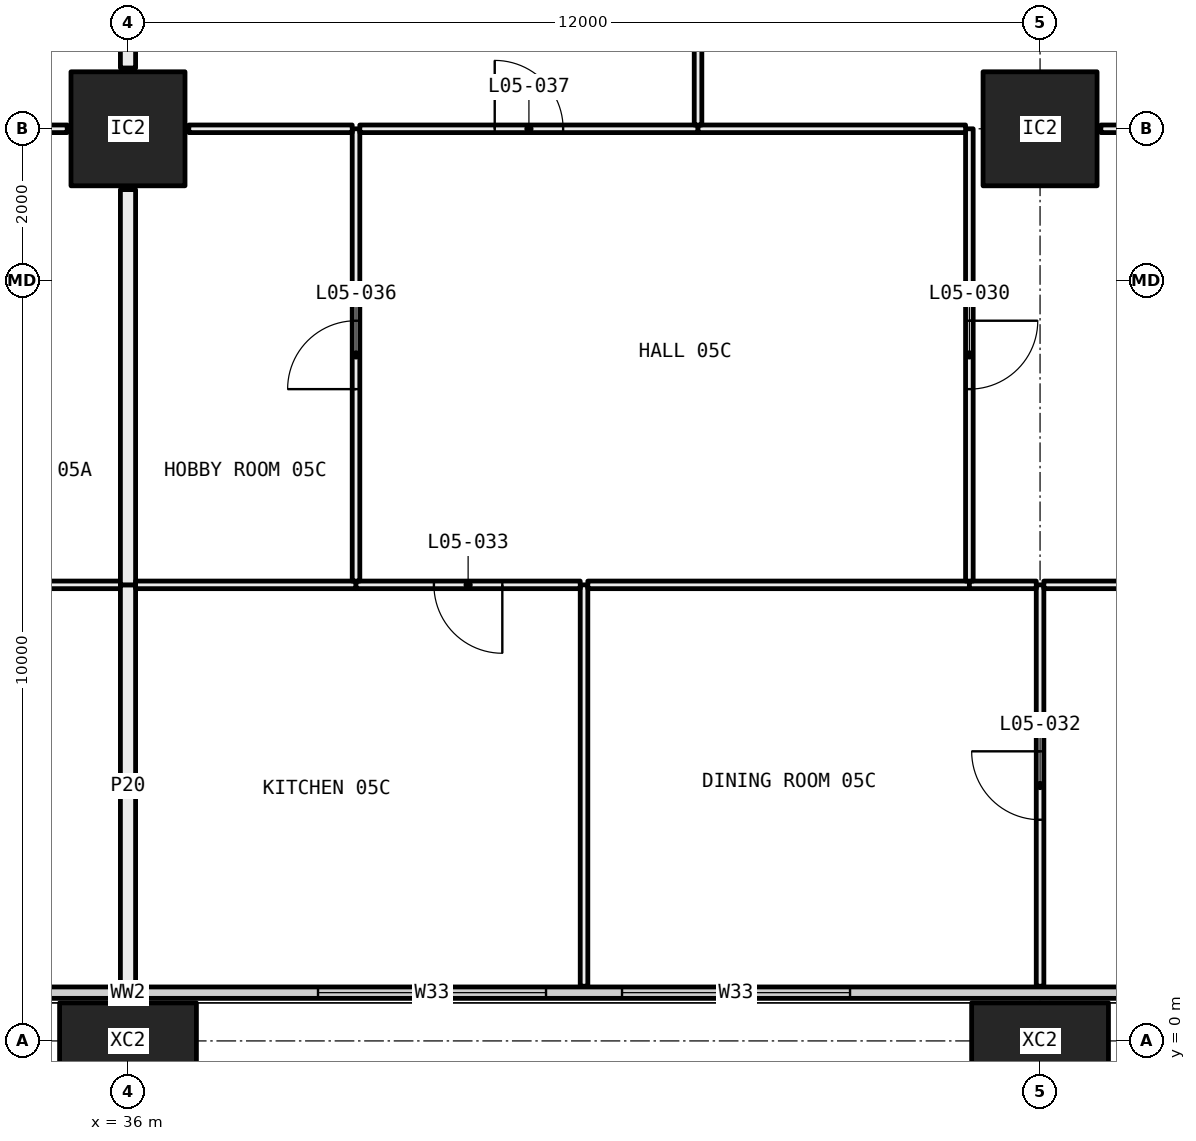
"""IFC4 building model, lengths in metres.
Left out: names, types, materials, properties, quantities, classifications, styles, units other than length and angle.
Written with IfcOpenShell. Run it as: python <this file> out.ifc"""

import sys

from ifc_helpers import new_model, si_unit, direction, frame, frame_2d, origin, origin_2d, place, context, subcontext, project, spatial, rectangle, hollow_rectangle, extrude, element, fill, save


model = new_model("IFC4")
c1 = context("Model", 3, precision=1e-05, world=origin(), true_north=direction((0.0, 1.0)))
c2 = subcontext(c1, "Body", "Model", "MODEL_VIEW")
j1 = project(units=[si_unit("LENGTHUNIT", "METRE"), si_unit("PLANEANGLEUNIT", "RADIAN")], contexts=[c1])
p1 = place(None, origin())
s1 = spatial("IfcSite", under=j1, at=p1, CompositionType="ELEMENT")
p2 = place(p1, origin())
s2 = spatial("IfcBuilding", under=s1, at=p2, CompositionType="ELEMENT")
p3 = place(p2, frame((0.0, 0.0, 30.0)))
s3 = spatial("IfcBuildingStorey", under=s2, at=p3, CompositionType="ELEMENT", Elevation=30.0)
p4 = place(p3, frame((36.0, 0.0, -0.4), z_axis=(0.0, 0.0, 1.0), x_axis=(1.0, 0.0, 0.0)))
e1 = element("IfcColumn", 1, at=p4, inside=s3, PredefinedType="COLUMN", context=c2, shape_type="SweptSolid", body=[
    extrude(hollow_rectangle(XDim=1.8, YDim=1.0, WallThickness=0.07, at=origin_2d()), origin(), (0.0, 0.0, 1.0), 3.45),
])
p5 = place(p3, frame((36.0, 12.0, 0.0), z_axis=(0.0, 0.0, 1.0), x_axis=(1.0, 0.0, 0.0)))
e2 = element("IfcColumn", 2, at=p5, inside=s3, PredefinedType="COLUMN", context=c2, shape_type="SweptSolid", body=[
    extrude(hollow_rectangle(XDim=1.5, YDim=1.5, WallThickness=0.065, at=origin_2d()), origin(), (0.0, 0.0, 1.0), 3.05),
])
p6 = place(p3, frame((48.0, 0.0, -0.4), z_axis=(0.0, 0.0, 1.0), x_axis=(1.0, 0.0, 0.0)))
e3 = element("IfcColumn", 3, at=p6, inside=s3, PredefinedType="COLUMN", context=c2, shape_type="SweptSolid", body=[
    extrude(hollow_rectangle(XDim=1.8, YDim=1.0, WallThickness=0.07, at=origin_2d()), origin(), (0.0, 0.0, 1.0), 3.45),
])
p7 = place(p3, frame((48.0, 12.0, 0.0), z_axis=(0.0, 0.0, 1.0), x_axis=(1.0, 0.0, 0.0)))
e4 = element("IfcColumn", 4, at=p7, inside=s3, PredefinedType="COLUMN", context=c2, shape_type="SweptSolid", body=[
    extrude(hollow_rectangle(XDim=1.5, YDim=1.5, WallThickness=0.065, at=origin_2d()), origin(), (0.0, 0.0, 1.0), 3.05),
])
p8 = place(p3, frame((6.56, 0.635, 0.0), z_axis=(0.0, 0.0, 1.0), x_axis=(1.0, 0.0, 0.0)))
e5 = element("IfcWall", 5, at=p8, inside=s3, PredefinedType="ELEMENTEDWALL", context=c2, shape_type="SweptSolid", body=[
    extrude(rectangle(XDim=58.88, YDim=0.15, at=frame_2d((29.44, 0.0))), origin(), (0.0, 0.0, 1.0), 3.05),
])
p9 = place(p8, frame((0.44, 0.0, 0.45)))
e6 = element("IfcOpeningElement", 6, at=p9, cuts=e5, PredefinedType="OPENING", context=c2, shape_type="SweptSolid", body=[
    extrude(rectangle(XDim=4.5, YDim=2.55, at=frame_2d((2.25, 1.275))), frame((0.0, 0.085, 0.0), z_axis=(0.0, -1.0, 0.0), x_axis=(1.0, 0.0, 0.0)), (0.0, 0.0, 1.0), 0.17),
])
p10 = place(p8, frame((7.94, 0.0, 0.45)))
e7 = element("IfcOpeningElement", 7, at=p10, cuts=e5, PredefinedType="OPENING", context=c2, shape_type="SweptSolid", body=[
    extrude(rectangle(XDim=3.0, YDim=2.55, at=frame_2d((1.5, 1.275))), frame((0.0, 0.085, 0.0), z_axis=(0.0, -1.0, 0.0), x_axis=(1.0, 0.0, 0.0)), (0.0, 0.0, 1.0), 0.17),
])
p11 = place(p8, frame((11.94, 0.0, 0.45)))
e8 = element("IfcOpeningElement", 8, at=p11, cuts=e5, PredefinedType="OPENING", context=c2, shape_type="SweptSolid", body=[
    extrude(rectangle(XDim=3.0, YDim=2.55, at=frame_2d((1.5, 1.275))), frame((0.0, 0.085, 0.0), z_axis=(0.0, -1.0, 0.0), x_axis=(1.0, 0.0, 0.0)), (0.0, 0.0, 1.0), 0.17),
])
p12 = place(p8, frame((19.94, 0.0, 0.45)))
e9 = element("IfcOpeningElement", 9, at=p12, cuts=e5, PredefinedType="OPENING", context=c2, shape_type="SweptSolid", body=[
    extrude(rectangle(XDim=3.0, YDim=2.55, at=frame_2d((1.5, 1.275))), frame((0.0, 0.085, 0.0), z_axis=(0.0, -1.0, 0.0), x_axis=(1.0, 0.0, 0.0)), (0.0, 0.0, 1.0), 0.17),
])
p13 = place(p8, frame((23.94, 0.0, 0.45)))
e10 = element("IfcOpeningElement", 10, at=p13, cuts=e5, PredefinedType="OPENING", context=c2, shape_type="SweptSolid", body=[
    extrude(rectangle(XDim=2.0, YDim=2.55, at=frame_2d((1.0, 1.275))), frame((0.0, 0.085, 0.0), z_axis=(0.0, -1.0, 0.0), x_axis=(1.0, 0.0, 0.0)), (0.0, 0.0, 1.0), 0.17),
])
p14 = place(p8, frame((31.94, 0.0, 0.45)))
e11 = element("IfcOpeningElement", 11, at=p14, cuts=e5, PredefinedType="OPENING", context=c2, shape_type="SweptSolid", body=[
    extrude(rectangle(XDim=3.0, YDim=2.55, at=frame_2d((1.5, 1.275))), frame((0.0, 0.085, 0.0), z_axis=(0.0, -1.0, 0.0), x_axis=(1.0, 0.0, 0.0)), (0.0, 0.0, 1.0), 0.17),
])
p15 = place(p8, frame((35.94, 0.0, 0.45)))
e12 = element("IfcOpeningElement", 12, at=p15, cuts=e5, PredefinedType="OPENING", context=c2, shape_type="SweptSolid", body=[
    extrude(rectangle(XDim=3.0, YDim=2.55, at=frame_2d((1.5, 1.275))), frame((0.0, 0.085, 0.0), z_axis=(0.0, -1.0, 0.0), x_axis=(1.0, 0.0, 0.0)), (0.0, 0.0, 1.0), 0.17),
])
p16 = place(p8, frame((43.94, 0.0, 0.45)))
e13 = element("IfcOpeningElement", 13, at=p16, cuts=e5, PredefinedType="OPENING", context=c2, shape_type="SweptSolid", body=[
    extrude(rectangle(XDim=3.0, YDim=2.55, at=frame_2d((1.5, 1.275))), frame((0.0, 0.085, 0.0), z_axis=(0.0, -1.0, 0.0), x_axis=(1.0, 0.0, 0.0)), (0.0, 0.0, 1.0), 0.17),
])
p17 = place(p8, frame((47.94, 0.0, 0.45)))
e14 = element("IfcOpeningElement", 14, at=p17, cuts=e5, PredefinedType="OPENING", context=c2, shape_type="SweptSolid", body=[
    extrude(rectangle(XDim=2.0, YDim=2.55, at=frame_2d((1.0, 1.275))), frame((0.0, 0.085, 0.0), z_axis=(0.0, -1.0, 0.0), x_axis=(1.0, 0.0, 0.0)), (0.0, 0.0, 1.0), 0.17),
])
p18 = place(p8, frame((53.94, 0.0, 0.45)))
e15 = element("IfcOpeningElement", 15, at=p18, cuts=e5, PredefinedType="OPENING", context=c2, shape_type="SweptSolid", body=[
    extrude(rectangle(XDim=4.5, YDim=2.55, at=frame_2d((2.25, 1.275))), frame((0.0, 0.085, 0.0), z_axis=(0.0, -1.0, 0.0), x_axis=(1.0, 0.0, 0.0)), (0.0, 0.0, 1.0), 0.17),
])
p19 = place(p3, frame((35.9, 6.0, 0.0), z_axis=(0.0, 0.0, 1.0), x_axis=(-1.0, 0.0, 0.0)))
e16 = element("IfcWall", 16, at=p19, inside=s3, PredefinedType="PARTITIONING", context=c2, shape_type="SweptSolid", body=[
    extrude(rectangle(XDim=2.9, YDim=0.1, at=frame_2d((1.45, 0.0))), origin(), (0.0, 0.0, 1.0), 3.05),
])
p20 = place(p3, frame((36.0, 0.72, 0.0), z_axis=(0.0, 0.0, 1.0), x_axis=(0.0, 1.0, 0.0)))
e17 = element("IfcWall", 17, at=p20, inside=s3, PredefinedType="PARTITIONING", context=c2, shape_type="SweptSolid", body=[
    extrude(rectangle(XDim=5.28, YDim=0.2, at=frame_2d((2.64, 0.0))), origin(), (0.0, 0.0, 1.0), 2.45),
])
p21 = place(p3, frame((35.2, 12.0, 0.0), z_axis=(0.0, 0.0, 1.0), x_axis=(-1.0, 0.0, 0.0)))
e18 = element("IfcWall", 18, at=p21, inside=s3, PredefinedType="PARTITIONING", context=c2, shape_type="SweptSolid", body=[
    extrude(rectangle(XDim=2.15, YDim=0.1, at=frame_2d((1.075, 0.0))), origin(), (0.0, 0.0, 1.0), 2.45),
])
for number, where, z_axis, x_axis in (
    (19, (36.0, 6.0, 0.0), (0.0, 0.0, 1.0), (0.0, 1.0, 0.0)),
    (20, (36.0, 12.8, 0.0), (0.0, 0.0, 1.0), (0.0, 1.0, 0.0)),
):
    element("IfcWall", number, at=place(p3, frame(where, z_axis=z_axis, x_axis=x_axis)), inside=s3, PredefinedType="PARTITIONING", context=c2, shape_type="SweptSolid", body=[
        extrude(rectangle(XDim=5.2, YDim=0.2, at=frame_2d((2.6, 0.0))), origin(), (0.0, 0.0, 1.0), 2.45),
    ])
p22 = place(p3, frame((42.0, 0.72, 0.0), z_axis=(0.0, 0.0, 1.0), x_axis=(0.0, 1.0, 0.0)))
e21 = element("IfcWall", 21, at=p22, inside=s3, PredefinedType="PARTITIONING", context=c2, shape_type="SweptSolid", body=[
    extrude(rectangle(XDim=5.28, YDim=0.1, at=frame_2d((2.64, 0.0))), origin(), (0.0, 0.0, 1.0), 3.05),
])
p23 = place(p3, frame((39.0, 6.0, 0.0), z_axis=(0.0, 0.0, 1.0), x_axis=(-1.0, 0.0, 0.0)))
e22 = element("IfcWall", 22, at=p23, inside=s3, PredefinedType="PARTITIONING", context=c2, shape_type="SweptSolid", body=[
    extrude(rectangle(XDim=2.9, YDim=0.1, at=frame_2d((1.45, 0.0))), origin(), (0.0, 0.0, 1.0), 3.05),
])
p24 = place(p3, frame((41.95, 6.0, 0.0), z_axis=(0.0, 0.0, 1.0), x_axis=(-1.0, 0.0, 0.0)))
e23 = element("IfcWall", 23, at=p24, inside=s3, PredefinedType="PARTITIONING", context=c2, shape_type="SweptSolid", body=[
    extrude(rectangle(XDim=2.95, YDim=0.1, at=frame_2d((1.475, 0.0))), origin(), (0.0, 0.0, 1.0), 3.05),
])
p25 = place(p24, frame((1.025, 0.0, 0.0)))
e24 = element("IfcOpeningElement", 24, at=p25, cuts=e23, PredefinedType="OPENING", context=c2, shape_type="SweptSolid", body=[
    extrude(rectangle(XDim=0.9, YDim=2.1, at=frame_2d((0.45, 1.05))), frame((0.0, 0.06, 0.0), z_axis=(0.0, -1.0, 0.0), x_axis=(1.0, 0.0, 0.0)), (0.0, 0.0, 1.0), 0.12),
])
p26 = place(p3, frame((48.0, 0.72, 0.0), z_axis=(0.0, 0.0, 1.0), x_axis=(0.0, 1.0, 0.0)))
e25 = element("IfcWall", 25, at=p26, inside=s3, PredefinedType="PARTITIONING", context=c2, shape_type="SweptSolid", body=[
    extrude(rectangle(XDim=5.28, YDim=0.1, at=frame_2d((2.64, 0.0))), origin(), (0.0, 0.0, 1.0), 2.45),
])
p27 = place(p26, frame((2.19, 0.0, 0.0)))
e26 = element("IfcOpeningElement", 26, at=p27, cuts=e25, PredefinedType="OPENING", context=c2, shape_type="SweptSolid", body=[
    extrude(rectangle(XDim=0.9, YDim=2.1, at=frame_2d((0.45, 1.05))), frame((0.0, 0.06, 0.0), z_axis=(0.0, -1.0, 0.0), x_axis=(1.0, 0.0, 0.0)), (0.0, 0.0, 1.0), 0.12),
])
p28 = place(p3, frame((47.07, 6.0, 0.0), z_axis=(0.0, 0.0, 1.0), x_axis=(-1.0, 0.0, 0.0)))
e27 = element("IfcWall", 27, at=p28, inside=s3, PredefinedType="PARTITIONING", context=c2, shape_type="SweptSolid", body=[
    extrude(rectangle(XDim=5.02, YDim=0.1, at=frame_2d((2.51, 0.0))), origin(), (0.0, 0.0, 1.0), 3.05),
])
p29 = place(p3, frame((47.95, 6.0, 0.0), z_axis=(0.0, 0.0, 1.0), x_axis=(-1.0, 0.0, 0.0)))
e28 = element("IfcWall", 28, at=p29, inside=s3, PredefinedType="PARTITIONING", context=c2, shape_type="SweptSolid", body=[
    extrude(rectangle(XDim=0.88, YDim=0.1, at=frame_2d((0.44, 0.0))), origin(), (0.0, 0.0, 1.0), 2.45),
])
p30 = place(p3, frame((55.14, 6.0, 0.0), z_axis=(0.0, 0.0, 1.0), x_axis=(-1.0, 0.0, 0.0)))
e29 = element("IfcWall", 29, at=p30, inside=s3, PredefinedType="PARTITIONING", context=c2, shape_type="SweptSolid", body=[
    extrude(rectangle(XDim=7.09, YDim=0.1, at=frame_2d((3.545, 0.0))), origin(), (0.0, 0.0, 1.0), 2.45),
])
p31 = place(p30, frame((3.095, 0.0, 0.0)))
e30 = element("IfcOpeningElement", 30, at=p31, cuts=e29, PredefinedType="OPENING", context=c2, shape_type="SweptSolid", body=[
    extrude(rectangle(XDim=0.9, YDim=2.1, at=frame_2d((0.45, 1.05))), frame((0.0, 0.06, 0.0), z_axis=(0.0, -1.0, 0.0), x_axis=(1.0, 0.0, 0.0)), (0.0, 0.0, 1.0), 0.12),
])
p32 = place(p3, frame((39.0, 6.05, 0.0), z_axis=(0.0, 0.0, 1.0), x_axis=(0.0, 1.0, 0.0)))
e31 = element("IfcWall", 31, at=p32, inside=s3, PredefinedType="PARTITIONING", context=c2, shape_type="SweptSolid", body=[
    extrude(rectangle(XDim=5.95, YDim=0.1, at=frame_2d((2.975, 0.0))), origin(), (0.0, 0.0, 1.0), 2.45),
])
p33 = place(p32, frame((2.525, 0.0, 0.0)))
e32 = element("IfcOpeningElement", 32, at=p33, cuts=e31, PredefinedType="OPENING", context=c2, shape_type="SweptSolid", body=[
    extrude(rectangle(XDim=0.9, YDim=2.1, at=frame_2d((0.45, 1.05))), frame((0.0, 0.06, 0.0), z_axis=(0.0, -1.0, 0.0), x_axis=(1.0, 0.0, 0.0)), (0.0, 0.0, 1.0), 0.12),
])
p34 = place(p3, frame((38.95, 12.0, 0.0), z_axis=(0.0, 0.0, 1.0), x_axis=(-1.0, 0.0, 0.0)))
e33 = element("IfcWall", 33, at=p34, inside=s3, PredefinedType="PARTITIONING", context=c2, shape_type="SweptSolid", body=[
    extrude(rectangle(XDim=2.15, YDim=0.1, at=frame_2d((1.075, 0.0))), origin(), (0.0, 0.0, 1.0), 2.45),
])
p35 = place(p3, frame((47.07, 6.05, 0.0), z_axis=(0.0, 0.0, 1.0), x_axis=(0.0, 1.0, 0.0)))
e34 = element("IfcWall", 34, at=p35, inside=s3, PredefinedType="PARTITIONING", context=c2, shape_type="SweptSolid", body=[
    extrude(rectangle(XDim=5.95, YDim=0.1, at=frame_2d((2.975, 0.0))), origin(), (0.0, 0.0, 1.0), 2.45),
])
p36 = place(p35, frame((2.525, 0.0, 0.0)))
e35 = element("IfcOpeningElement", 35, at=p36, cuts=e34, PredefinedType="OPENING", context=c2, shape_type="SweptSolid", body=[
    extrude(rectangle(XDim=0.9, YDim=2.1, at=frame_2d((0.45, 1.05))), frame((0.0, 0.06, 0.0), z_axis=(0.0, -1.0, 0.0), x_axis=(1.0, 0.0, 0.0)), (0.0, 0.0, 1.0), 0.12),
])
p37 = place(p3, frame((43.5, 12.0, 0.0), z_axis=(0.0, 0.0, 1.0), x_axis=(-1.0, 0.0, 0.0)))
e36 = element("IfcWall", 36, at=p37, inside=s3, PredefinedType="PARTITIONING", context=c2, shape_type="SweptSolid", body=[
    extrude(rectangle(XDim=4.45, YDim=0.1, at=frame_2d((2.225, 0.0))), origin(), (0.0, 0.0, 1.0), 2.45),
])
p38 = place(p37, frame((1.775, 0.0, 0.0)))
e37 = element("IfcOpeningElement", 37, at=p38, cuts=e36, PredefinedType="OPENING", context=c2, shape_type="SweptSolid", body=[
    extrude(rectangle(XDim=0.9, YDim=2.1, at=frame_2d((0.45, 1.05))), frame((0.0, 0.06, 0.0), z_axis=(0.0, -1.0, 0.0), x_axis=(1.0, 0.0, 0.0)), (0.0, 0.0, 1.0), 0.12),
])
p39 = place(p3, frame((47.02, 12.0, 0.0), z_axis=(0.0, 0.0, 1.0), x_axis=(-1.0, 0.0, 0.0)))
e38 = element("IfcWall", 38, at=p39, inside=s3, PredefinedType="PARTITIONING", context=c2, shape_type="SweptSolid", body=[
    extrude(rectangle(XDim=3.52, YDim=0.1, at=frame_2d((1.76, 0.0))), origin(), (0.0, 0.0, 1.0), 2.45),
])
p40 = place(p3, frame((51.0, 12.0, 0.0), z_axis=(0.0, 0.0, 1.0), x_axis=(-1.0, 0.0, 0.0)))
e39 = element("IfcWall", 39, at=p40, inside=s3, PredefinedType="PARTITIONING", context=c2, shape_type="SweptSolid", body=[
    extrude(rectangle(XDim=2.2, YDim=0.1, at=frame_2d((1.1, 0.0))), origin(), (0.0, 0.0, 1.0), 2.45),
])
p41 = place(p3, frame((43.5, 12.05, 0.0), z_axis=(0.0, 0.0, 1.0), x_axis=(0.0, 1.0, 0.0)))
e40 = element("IfcWall", 40, at=p41, inside=s3, PredefinedType="PARTITIONING", context=c2, shape_type="SweptSolid", body=[
    extrude(rectangle(XDim=5.95, YDim=0.1, at=frame_2d((2.975, 0.0))), origin(), (0.0, 0.0, 1.0), 2.45),
])
p42 = place(p14, origin())
e41 = element("IfcWindow", 41, at=p42, inside=s3, PartitioningType="SINGLE_PANEL", PredefinedType="WINDOW", context=c2, shape_type="SweptSolid", body=[
    extrude(rectangle(XDim=3.0, YDim=2.55, at=frame_2d((1.5, 1.275))), frame((0.0, 0.03, 0.0), z_axis=(0.0, -1.0, 0.0), x_axis=(1.0, 0.0, 0.0)), (0.0, 0.0, 1.0), 0.06),
])
fill(e11, e41)
p43 = place(p15, origin())
e42 = element("IfcWindow", 42, at=p43, inside=s3, PartitioningType="SINGLE_PANEL", PredefinedType="WINDOW", context=c2, shape_type="SweptSolid", body=[
    extrude(rectangle(XDim=3.0, YDim=2.55, at=frame_2d((1.5, 1.275))), frame((0.0, 0.03, 0.0), z_axis=(0.0, -1.0, 0.0), x_axis=(1.0, 0.0, 0.0)), (0.0, 0.0, 1.0), 0.06),
])
fill(e12, e42)
p44 = place(p36, frame((0.9, 0.0, 0.0), x_axis=(-1.0, 0.0, 0.0)))
e43 = element("IfcDoor", 43, at=p44, inside=s3, OperationType="SINGLE_SWING_RIGHT", PredefinedType="DOOR", context=c2, shape_type="SweptSolid", body=[
    extrude(rectangle(XDim=0.9, YDim=2.1, at=frame_2d((0.45, 1.05))), frame((0.0, 0.025, 0.0), z_axis=(0.0, -1.0, 0.0), x_axis=(1.0, 0.0, 0.0)), (0.0, 0.0, 1.0), 0.05),
])
fill(e35, e43)
p45 = place(p27, origin())
e44 = element("IfcDoor", 44, at=p45, inside=s3, OperationType="SINGLE_SWING_LEFT", PredefinedType="DOOR", context=c2, shape_type="SweptSolid", body=[
    extrude(rectangle(XDim=0.9, YDim=2.1, at=frame_2d((0.45, 1.05))), frame((0.0, 0.025, 0.0), z_axis=(0.0, -1.0, 0.0), x_axis=(1.0, 0.0, 0.0)), (0.0, 0.0, 1.0), 0.05),
])
fill(e26, e44)
p46 = place(p25, origin())
e45 = element("IfcDoor", 45, at=p46, inside=s3, OperationType="SINGLE_SWING_RIGHT", PredefinedType="DOOR", context=c2, shape_type="SweptSolid", body=[
    extrude(rectangle(XDim=0.9, YDim=2.1, at=frame_2d((0.45, 1.05))), frame((0.0, 0.025, 0.0), z_axis=(0.0, -1.0, 0.0), x_axis=(1.0, 0.0, 0.0)), (0.0, 0.0, 1.0), 0.05),
])
fill(e24, e45)
p47 = place(p33, origin())
e46 = element("IfcDoor", 46, at=p47, inside=s3, OperationType="SINGLE_SWING_RIGHT", PredefinedType="DOOR", context=c2, shape_type="SweptSolid", body=[
    extrude(rectangle(XDim=0.9, YDim=2.1, at=frame_2d((0.45, 1.05))), frame((0.0, 0.025, 0.0), z_axis=(0.0, -1.0, 0.0), x_axis=(1.0, 0.0, 0.0)), (0.0, 0.0, 1.0), 0.05),
])
fill(e32, e46)
p48 = place(p38, frame((0.9, 0.0, 0.0), x_axis=(-1.0, 0.0, 0.0)))
e47 = element("IfcDoor", 47, at=p48, inside=s3, OperationType="SINGLE_SWING_RIGHT", PredefinedType="DOOR", context=c2, shape_type="SweptSolid", body=[
    extrude(rectangle(XDim=0.9, YDim=2.1, at=frame_2d((0.45, 1.05))), frame((0.0, 0.025, 0.0), z_axis=(0.0, -1.0, 0.0), x_axis=(1.0, 0.0, 0.0)), (0.0, 0.0, 1.0), 0.05),
])
fill(e37, e47)
save(model, sys.argv[1])
